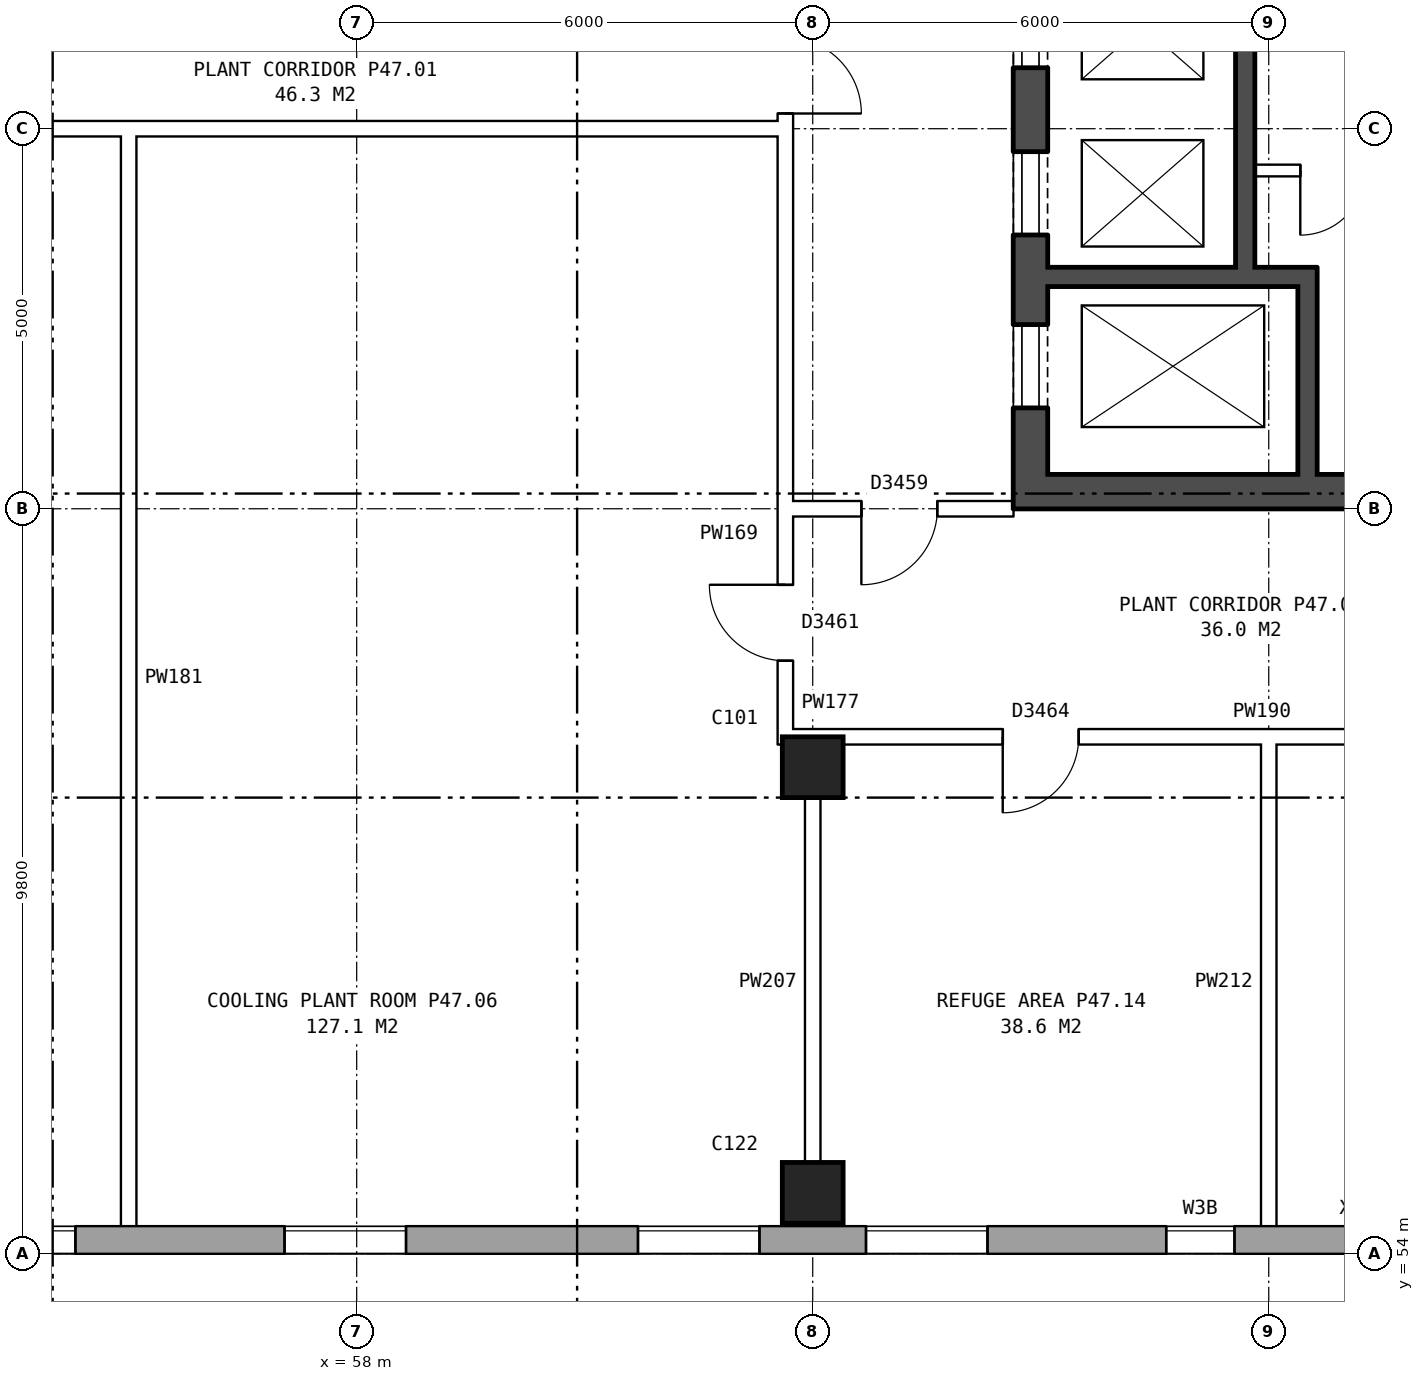
"""IFC4 building model, lengths in metres.
Left out: names, types, materials, properties, quantities, classifications, styles, units other than length and angle.
Written with IfcOpenShell. Run it as: python <this file> out.ifc"""

import sys

from ifc_helpers import new_model, si_unit, direction, frame, frame_2d, origin, origin_2d, place, context, subcontext, project, spatial, rectangle, extrude, element, fill, save


model = new_model("IFC4")
c1 = context("Model", 3, precision=1e-05, world=origin(), true_north=direction((0.0, 1.0)))
c2 = subcontext(c1, "Body", "Model", "MODEL_VIEW")
j1 = project(units=[si_unit("LENGTHUNIT", "METRE"), si_unit("PLANEANGLEUNIT", "RADIAN")], contexts=[c1])
p1 = place(None, origin())
s1 = spatial("IfcSite", under=j1, at=p1, CompositionType="ELEMENT")
p2 = place(p1, origin())
s2 = spatial("IfcBuilding", under=s1, at=p2, CompositionType="ELEMENT")
p3 = place(p2, frame((0.0, 0.0, 167.1)))
s3 = spatial("IfcBuildingStorey", under=s2, at=p3, CompositionType="ELEMENT", Elevation=167.1)
for number, where, z_axis, x_axis in (
    (1, (64.0, 54.8, 0.0), (0.0, 0.0, 1.0), (1.0, 0.0, 0.0)),
    (2, (64.0, 60.4, 0.0), (0.0, 0.0, 1.0), (1.0, 0.0, 0.0)),
):
    element("IfcColumn", number, at=place(p3, frame(where, z_axis=z_axis, x_axis=x_axis)), inside=s3, PredefinedType="COLUMN", context=c2, shape_type="SweptSolid", body=[
        extrude(rectangle(XDim=0.8, YDim=0.8, at=origin_2d()), origin(), (0.0, 0.0, 1.0), 4.2),
    ])
p4 = place(p3, frame((33.325, 54.18, 0.0), z_axis=(0.0, 0.0, 1.0), x_axis=(1.0, 0.0, 0.0)))
e3 = element("IfcWall", 3, at=p4, inside=s3, PredefinedType="STANDARD", context=c2, shape_type="SweptSolid", body=[
    extrude(rectangle(XDim=39.601, YDim=0.36, at=frame_2d((19.8, 0.0))), origin(), (0.0, 0.0, 1.0), 4.2),
])
p5 = place(p4, frame((0.5, 0.0, 1.5)))
e4 = element("IfcOpeningElement", 4, at=p5, cuts=e3, PredefinedType="OPENING", context=c2, shape_type="SweptSolid", body=[
    extrude(rectangle(XDim=1.6, YDim=1.2, at=frame_2d((0.8, 0.6))), frame((0.0, 0.19, 0.0), z_axis=(0.0, -1.0, 0.0), x_axis=(1.0, 0.0, 0.0)), (0.0, 0.0, 1.0), 0.38),
])
p6 = place(p4, frame((5.125, 0.0, 1.5)))
e5 = element("IfcOpeningElement", 5, at=p6, cuts=e3, PredefinedType="OPENING", context=c2, shape_type="SweptSolid", body=[
    extrude(rectangle(XDim=1.6, YDim=1.2, at=frame_2d((0.8, 0.6))), frame((0.0, 0.19, 0.0), z_axis=(0.0, -1.0, 0.0), x_axis=(1.0, 0.0, 0.0)), (0.0, 0.0, 1.0), 0.38),
])
p7 = place(p4, frame((7.375, 0.0, 1.5)))
e6 = element("IfcOpeningElement", 6, at=p7, cuts=e3, PredefinedType="OPENING", context=c2, shape_type="SweptSolid", body=[
    extrude(rectangle(XDim=1.6, YDim=1.2, at=frame_2d((0.8, 0.6))), frame((0.0, 0.19, 0.0), z_axis=(0.0, -1.0, 0.0), x_axis=(1.0, 0.0, 0.0)), (0.0, 0.0, 1.0), 0.38),
])
p8 = place(p4, frame((12.125, 0.0, 1.5)))
e7 = element("IfcOpeningElement", 7, at=p8, cuts=e3, PredefinedType="OPENING", context=c2, shape_type="SweptSolid", body=[
    extrude(rectangle(XDim=1.6, YDim=1.2, at=frame_2d((0.8, 0.6))), frame((0.0, 0.19, 0.0), z_axis=(0.0, -1.0, 0.0), x_axis=(1.0, 0.0, 0.0)), (0.0, 0.0, 1.0), 0.38),
])
p9 = place(p4, frame((18.275, 0.0, 1.5)))
e8 = element("IfcOpeningElement", 8, at=p9, cuts=e3, PredefinedType="OPENING", context=c2, shape_type="SweptSolid", body=[
    extrude(rectangle(XDim=0.6, YDim=1.2, at=frame_2d((0.3, 0.6))), frame((0.0, 0.19, 0.0), z_axis=(0.0, -1.0, 0.0), x_axis=(1.0, 0.0, 0.0)), (0.0, 0.0, 1.0), 0.38),
])
p10 = place(p4, frame((16.375, 0.0, 1.5)))
e9 = element("IfcOpeningElement", 9, at=p10, cuts=e3, PredefinedType="OPENING", context=c2, shape_type="SweptSolid", body=[
    extrude(rectangle(XDim=1.6, YDim=1.2, at=frame_2d((0.8, 0.6))), frame((0.0, 0.19, 0.0), z_axis=(0.0, -1.0, 0.0), x_axis=(1.0, 0.0, 0.0)), (0.0, 0.0, 1.0), 0.38),
])
p11 = place(p4, frame((19.375, 0.0, 1.5)))
e10 = element("IfcOpeningElement", 10, at=p11, cuts=e3, PredefinedType="OPENING", context=c2, shape_type="SweptSolid", body=[
    extrude(rectangle(XDim=1.6, YDim=1.2, at=frame_2d((0.8, 0.6))), frame((0.0, 0.19, 0.0), z_axis=(0.0, -1.0, 0.0), x_axis=(1.0, 0.0, 0.0)), (0.0, 0.0, 1.0), 0.38),
])
p12 = place(p4, frame((23.725, 0.0, 1.5)))
e11 = element("IfcOpeningElement", 11, at=p12, cuts=e3, PredefinedType="OPENING", context=c2, shape_type="SweptSolid", body=[
    extrude(rectangle(XDim=1.6, YDim=1.2, at=frame_2d((0.8, 0.6))), frame((0.0, 0.19, 0.0), z_axis=(0.0, -1.0, 0.0), x_axis=(1.0, 0.0, 0.0)), (0.0, 0.0, 1.0), 0.38),
])
p13 = place(p4, frame((28.375, 0.0, 1.5)))
e12 = element("IfcOpeningElement", 12, at=p13, cuts=e3, PredefinedType="OPENING", context=c2, shape_type="SweptSolid", body=[
    extrude(rectangle(XDim=1.6, YDim=1.2, at=frame_2d((0.8, 0.6))), frame((0.0, 0.19, 0.0), z_axis=(0.0, -1.0, 0.0), x_axis=(1.0, 0.0, 0.0)), (0.0, 0.0, 1.0), 0.38),
])
p14 = place(p4, frame((31.375, 0.0, 1.5)))
e13 = element("IfcOpeningElement", 13, at=p14, cuts=e3, PredefinedType="OPENING", context=c2, shape_type="SweptSolid", body=[
    extrude(rectangle(XDim=1.6, YDim=1.2, at=frame_2d((0.8, 0.6))), frame((0.0, 0.19, 0.0), z_axis=(0.0, -1.0, 0.0), x_axis=(1.0, 0.0, 0.0)), (0.0, 0.0, 1.0), 0.38),
])
p15 = place(p4, frame((35.325, 0.0, 1.5)))
e14 = element("IfcOpeningElement", 14, at=p15, cuts=e3, PredefinedType="OPENING", context=c2, shape_type="SweptSolid", body=[
    extrude(rectangle(XDim=0.9, YDim=1.2, at=frame_2d((0.45, 0.6))), frame((0.0, 0.19, 0.0), z_axis=(0.0, -1.0, 0.0), x_axis=(1.0, 0.0, 0.0)), (0.0, 0.0, 1.0), 0.38),
])
p16 = place(p3, frame((66.865, 63.8, 0.0), z_axis=(0.0, 0.0, 1.0), x_axis=(0.0, 1.0, 0.0)))
e15 = element("IfcWall", 15, at=p16, inside=s3, PredefinedType="SHEAR", context=c2, shape_type="SweptSolid", body=[
    extrude(rectangle(XDim=12.4, YDim=0.45, at=frame_2d((6.2, 0.0))), origin(), (0.0, 0.0, 1.0), 4.2),
])
p17 = place(p16, frame((1.325, 0.0, 0.0)))
e16 = element("IfcOpeningElement", 16, at=p17, cuts=e15, PredefinedType="OPENING", context=c2, shape_type="SweptSolid", body=[
    extrude(rectangle(XDim=1.1, YDim=2.1, at=frame_2d((0.55, 1.05))), frame((0.0, 0.235, 0.0), z_axis=(0.0, -1.0, 0.0), x_axis=(1.0, 0.0, 0.0)), (0.0, 0.0, 1.0), 0.47),
])
p18 = place(p16, frame((3.6, 0.0, 0.0)))
e17 = element("IfcOpeningElement", 17, at=p18, cuts=e15, PredefinedType="OPENING", context=c2, shape_type="SweptSolid", body=[
    extrude(rectangle(XDim=1.1, YDim=2.1, at=frame_2d((0.55, 1.05))), frame((0.0, 0.235, 0.0), z_axis=(0.0, -1.0, 0.0), x_axis=(1.0, 0.0, 0.0)), (0.0, 0.0, 1.0), 0.47),
])
p19 = place(p16, frame((5.8, 0.0, 0.0)))
e18 = element("IfcOpeningElement", 18, at=p19, cuts=e15, PredefinedType="OPENING", context=c2, shape_type="SweptSolid", body=[
    extrude(rectangle(XDim=1.1, YDim=2.1, at=frame_2d((0.55, 1.05))), frame((0.0, 0.235, 0.0), z_axis=(0.0, -1.0, 0.0), x_axis=(1.0, 0.0, 0.0)), (0.0, 0.0, 1.0), 0.47),
])
p20 = place(p16, frame((8.0, 0.0, 0.0)))
e19 = element("IfcOpeningElement", 19, at=p20, cuts=e15, PredefinedType="OPENING", context=c2, shape_type="SweptSolid", body=[
    extrude(rectangle(XDim=1.1, YDim=2.1, at=frame_2d((0.55, 1.05))), frame((0.0, 0.235, 0.0), z_axis=(0.0, -1.0, 0.0), x_axis=(1.0, 0.0, 0.0)), (0.0, 0.0, 1.0), 0.47),
])
p21 = place(p16, frame((9.9, 0.0, 0.0)))
e20 = element("IfcOpeningElement", 20, at=p21, cuts=e15, PredefinedType="OPENING", context=c2, shape_type="SweptSolid", body=[
    extrude(rectangle(XDim=1.1, YDim=2.1, at=frame_2d((0.55, 1.05))), frame((0.0, 0.235, 0.0), z_axis=(0.0, -1.0, 0.0), x_axis=(1.0, 0.0, 0.0)), (0.0, 0.0, 1.0), 0.47),
])
p22 = place(p3, frame((67.09, 64.025, 0.0), z_axis=(0.0, 0.0, 1.0), x_axis=(1.0, 0.0, 0.0)))
e21 = element("IfcWall", 21, at=p22, inside=s3, PredefinedType="SHEAR", context=c2, shape_type="SweptSolid", body=[
    extrude(rectangle(XDim=8.1, YDim=0.45, at=frame_2d((4.05, 0.0))), origin(), (0.0, 0.0, 1.0), 4.2),
])
p23 = place(p3, frame((67.09, 66.85, 0.0), z_axis=(0.0, 0.0, 1.0), x_axis=(1.0, 0.0, 0.0)))
e22 = element("IfcWall", 22, at=p23, inside=s3, PredefinedType="SHEAR", context=c2, shape_type="SweptSolid", body=[
    extrude(rectangle(XDim=3.545, YDim=0.25, at=frame_2d((1.772, 0.0))), origin(), (0.0, 0.0, 1.0), 4.2),
])
p24 = place(p3, frame((69.815, 68.25, 0.0), z_axis=(0.0, 0.0, 1.0), x_axis=(1.0, 0.0, 0.0)))
e23 = element("IfcWall", 23, at=p24, inside=s3, PredefinedType="PARTITIONING", context=c2, shape_type="SweptSolid", body=[
    extrude(rectangle(XDim=2.05, YDim=0.15, at=frame_2d((1.025, 0.0))), origin(), (0.0, 0.0, 1.0), 4.2),
])
p25 = place(p24, frame((0.6, 0.0, 0.0)))
e24 = element("IfcOpeningElement", 24, at=p25, cuts=e23, PredefinedType="OPENING", context=c2, shape_type="SweptSolid", body=[
    extrude(rectangle(XDim=0.85, YDim=2.1, at=frame_2d((0.425, 1.05))), frame((0.0, 0.085, 0.0), z_axis=(0.0, -1.0, 0.0), x_axis=(1.0, 0.0, 0.0)), (0.0, 0.0, 1.0), 0.17),
])
p26 = place(p3, frame((69.69, 66.975, 0.0), z_axis=(0.0, 0.0, 1.0), x_axis=(0.0, 1.0, 0.0)))
e25 = element("IfcWall", 25, at=p26, inside=s3, PredefinedType="SHEAR", context=c2, shape_type="SweptSolid", body=[
    extrude(rectangle(XDim=6.6, YDim=0.25, at=frame_2d((3.3, 0.0))), origin(), (0.0, 0.0, 1.0), 4.2),
])
p27 = place(p3, frame((70.51, 64.25, 0.0), z_axis=(0.0, 0.0, 1.0), x_axis=(0.0, 1.0, 0.0)))
e26 = element("IfcWall", 26, at=p27, inside=s3, PredefinedType="SHEAR", context=c2, shape_type="SweptSolid", body=[
    extrude(rectangle(XDim=2.475, YDim=0.25, at=frame_2d((1.238, 0.0))), origin(), (0.0, 0.0, 1.0), 4.2),
])
p28 = place(p3, frame((63.64, 63.9, 0.0), z_axis=(0.0, 0.0, 1.0), x_axis=(0.0, 1.0, 0.0)))
e27 = element("IfcWall", 27, at=p28, inside=s3, PredefinedType="PARTITIONING", context=c2, shape_type="SweptSolid", body=[
    extrude(rectangle(XDim=12.2, YDim=0.2, at=frame_2d((6.1, 0.0))), origin(), (0.0, 0.0, 1.0), 4.2),
])
p29 = place(p28, frame((5.1, 0.0, 0.0)))
e28 = element("IfcOpeningElement", 28, at=p29, cuts=e27, PredefinedType="OPENING", context=c2, shape_type="SweptSolid", body=[
    extrude(rectangle(XDim=2.0, YDim=2.1, at=frame_2d((1.0, 1.05))), frame((0.0, 0.11, 0.0), z_axis=(0.0, -1.0, 0.0), x_axis=(1.0, 0.0, 0.0)), (0.0, 0.0, 1.0), 0.22),
])
p30 = place(p3, frame((63.54, 60.8, 0.0), z_axis=(0.0, 0.0, 1.0), x_axis=(1.0, 0.0, 0.0)))
e29 = element("IfcWall", 29, at=p30, inside=s3, PredefinedType="PARTITIONING", context=c2, shape_type="SweptSolid", body=[
    extrude(rectangle(XDim=12.22, YDim=0.2, at=frame_2d((6.11, 0.0))), origin(), (0.0, 0.0, 1.0), 4.2),
])
p31 = place(p30, frame((2.96, 0.0, 0.0)))
e30 = element("IfcOpeningElement", 30, at=p31, cuts=e29, PredefinedType="OPENING", context=c2, shape_type="SweptSolid", body=[
    extrude(rectangle(XDim=1.0, YDim=2.1, at=frame_2d((0.5, 1.05))), frame((0.0, 0.11, 0.0), z_axis=(0.0, -1.0, 0.0), x_axis=(1.0, 0.0, 0.0)), (0.0, 0.0, 1.0), 0.22),
])
p32 = place(p30, frame((8.78, 0.0, 0.0)))
e31 = element("IfcOpeningElement", 31, at=p32, cuts=e29, PredefinedType="OPENING", context=c2, shape_type="SweptSolid", body=[
    extrude(rectangle(XDim=1.0, YDim=2.1, at=frame_2d((0.5, 1.05))), frame((0.0, 0.11, 0.0), z_axis=(0.0, -1.0, 0.0), x_axis=(1.0, 0.0, 0.0)), (0.0, 0.0, 1.0), 0.22),
])
p33 = place(p3, frame((63.54, 63.8, 0.0), z_axis=(0.0, 0.0, 1.0), x_axis=(1.0, 0.0, 0.0)))
e32 = element("IfcWall", 32, at=p33, inside=s3, PredefinedType="PARTITIONING", context=c2, shape_type="SweptSolid", body=[
    extrude(rectangle(XDim=3.1, YDim=0.2, at=frame_2d((1.55, 0.0))), origin(), (0.0, 0.0, 1.0), 4.2),
])
p34 = place(p33, frame((1.1, 0.0, 0.0)))
e33 = element("IfcOpeningElement", 33, at=p34, cuts=e32, PredefinedType="OPENING", context=c2, shape_type="SweptSolid", body=[
    extrude(rectangle(XDim=1.0, YDim=2.1, at=frame_2d((0.5, 1.05))), frame((0.0, 0.11, 0.0), z_axis=(0.0, -1.0, 0.0), x_axis=(1.0, 0.0, 0.0)), (0.0, 0.0, 1.0), 0.22),
])
p35 = place(p3, frame((44.36, 68.8, 0.0), z_axis=(0.0, 0.0, 1.0), x_axis=(1.0, 0.0, 0.0)))
e34 = element("IfcWall", 34, at=p35, inside=s3, PredefinedType="PARTITIONING", context=c2, shape_type="SweptSolid", body=[
    extrude(rectangle(XDim=19.28, YDim=0.2, at=frame_2d((9.64, 0.0))), origin(), (0.0, 0.0, 1.0), 4.2),
])
p36 = place(p3, frame((55.0, 54.24, 0.0), z_axis=(0.0, 0.0, 1.0), x_axis=(0.0, 1.0, 0.0)))
e35 = element("IfcWall", 35, at=p36, inside=s3, PredefinedType="PARTITIONING", context=c2, shape_type="SweptSolid", body=[
    extrude(rectangle(XDim=14.66, YDim=0.2, at=frame_2d((7.33, 0.0))), origin(), (0.0, 0.0, 1.0), 4.2),
])
p37 = place(p3, frame((63.64, 60.7, 0.0), z_axis=(0.0, 0.0, 1.0), x_axis=(0.0, 1.0, 0.0)))
e36 = element("IfcWall", 36, at=p37, inside=s3, PredefinedType="PARTITIONING", context=c2, shape_type="SweptSolid", body=[
    extrude(rectangle(XDim=3.2, YDim=0.2, at=frame_2d((1.6, 0.0))), origin(), (0.0, 0.0, 1.0), 4.2),
])
p38 = place(p37, frame((1.1, 0.0, 0.0)))
e37 = element("IfcOpeningElement", 37, at=p38, cuts=e36, PredefinedType="OPENING", context=c2, shape_type="SweptSolid", body=[
    extrude(rectangle(XDim=1.0, YDim=2.1, at=frame_2d((0.5, 1.05))), frame((0.0, 0.11, 0.0), z_axis=(0.0, -1.0, 0.0), x_axis=(1.0, 0.0, 0.0)), (0.0, 0.0, 1.0), 0.22),
])
for number, where, z_axis, x_axis in (
    (38, (64.0, 54.24, 0.0), (0.0, 0.0, 1.0), (0.0, 1.0, 0.0)),
    (39, (70.0, 54.24, 0.0), (0.0, 0.0, 1.0), (0.0, 1.0, 0.0)),
):
    element("IfcWall", number, at=place(p3, frame(where, z_axis=z_axis, x_axis=x_axis)), inside=s3, PredefinedType="PARTITIONING", context=c2, shape_type="SweptSolid", body=[
        extrude(rectangle(XDim=6.66, YDim=0.2, at=frame_2d((3.33, 0.0))), origin(), (0.0, 0.0, 1.0), 4.2),
    ])
p39 = place(p11, origin())
e40 = element("IfcWindow", 40, at=p39, inside=s3, PartitioningType="DOUBLE_PANEL_HORIZONTAL", PredefinedType="WINDOW", context=c2, shape_type="SweptSolid", body=[
    extrude(rectangle(XDim=1.6, YDim=1.2, at=frame_2d((0.8, 0.6))), frame((0.0, 0.15, 0.0), z_axis=(0.0, -1.0, 0.0), x_axis=(1.0, 0.0, 0.0)), (0.0, 0.0, 1.0), 0.06),
])
fill(e10, e40)
p40 = place(p12, origin())
e41 = element("IfcWindow", 41, at=p40, inside=s3, PartitioningType="DOUBLE_PANEL_HORIZONTAL", PredefinedType="WINDOW", context=c2, shape_type="SweptSolid", body=[
    extrude(rectangle(XDim=1.6, YDim=1.2, at=frame_2d((0.8, 0.6))), frame((0.0, 0.15, 0.0), z_axis=(0.0, -1.0, 0.0), x_axis=(1.0, 0.0, 0.0)), (0.0, 0.0, 1.0), 0.06),
])
fill(e11, e41)
p41 = place(p13, origin())
e42 = element("IfcWindow", 42, at=p41, inside=s3, PartitioningType="DOUBLE_PANEL_HORIZONTAL", PredefinedType="WINDOW", context=c2, shape_type="SweptSolid", body=[
    extrude(rectangle(XDim=1.6, YDim=1.2, at=frame_2d((0.8, 0.6))), frame((0.0, 0.15, 0.0), z_axis=(0.0, -1.0, 0.0), x_axis=(1.0, 0.0, 0.0)), (0.0, 0.0, 1.0), 0.06),
])
fill(e12, e42)
p42 = place(p14, origin())
e43 = element("IfcWindow", 43, at=p42, inside=s3, PartitioningType="DOUBLE_PANEL_HORIZONTAL", PredefinedType="WINDOW", context=c2, shape_type="SweptSolid", body=[
    extrude(rectangle(XDim=1.6, YDim=1.2, at=frame_2d((0.8, 0.6))), frame((0.0, 0.15, 0.0), z_axis=(0.0, -1.0, 0.0), x_axis=(1.0, 0.0, 0.0)), (0.0, 0.0, 1.0), 0.06),
])
fill(e13, e43)
p43 = place(p15, origin())
e44 = element("IfcWindow", 44, at=p43, inside=s3, PartitioningType="DOUBLE_PANEL_HORIZONTAL", PredefinedType="WINDOW", context=c2, shape_type="SweptSolid", body=[
    extrude(rectangle(XDim=0.9, YDim=1.2, at=frame_2d((0.45, 0.6))), frame((0.0, 0.15, 0.0), z_axis=(0.0, -1.0, 0.0), x_axis=(1.0, 0.0, 0.0)), (0.0, 0.0, 1.0), 0.06),
])
fill(e14, e44)
p44 = place(p17, origin())
e45 = element("IfcDoor", 45, at=p44, inside=s3, OperationType="DOUBLE_DOOR_SLIDING", PredefinedType="DOOR", context=c2, shape_type="SweptSolid", body=[
    extrude(rectangle(XDim=1.1, YDim=2.1, at=frame_2d((0.55, 1.05))), frame((0.0, -0.16, 0.0), z_axis=(0.0, -1.0, 0.0), x_axis=(1.0, 0.0, 0.0)), (0.0, 0.0, 1.0), 0.05),
])
fill(e16, e45)
p45 = place(p18, origin())
e46 = element("IfcDoor", 46, at=p45, inside=s3, OperationType="DOUBLE_DOOR_SLIDING", PredefinedType="DOOR", context=c2, shape_type="SweptSolid", body=[
    extrude(rectangle(XDim=1.1, YDim=2.1, at=frame_2d((0.55, 1.05))), frame((0.0, -0.16, 0.0), z_axis=(0.0, -1.0, 0.0), x_axis=(1.0, 0.0, 0.0)), (0.0, 0.0, 1.0), 0.05),
])
fill(e17, e46)
p46 = place(p19, origin())
e47 = element("IfcDoor", 47, at=p46, inside=s3, OperationType="DOUBLE_DOOR_SLIDING", PredefinedType="DOOR", context=c2, shape_type="SweptSolid", body=[
    extrude(rectangle(XDim=1.1, YDim=2.1, at=frame_2d((0.55, 1.05))), frame((0.0, -0.16, 0.0), z_axis=(0.0, -1.0, 0.0), x_axis=(1.0, 0.0, 0.0)), (0.0, 0.0, 1.0), 0.05),
])
fill(e18, e47)
p47 = place(p25, frame((0.85, 0.0, 0.0), z_axis=(0.0, 0.0, 1.0), x_axis=(-1.0, 0.0, 0.0)))
e48 = element("IfcDoor", 48, at=p47, inside=s3, OperationType="SINGLE_SWING_RIGHT", PredefinedType="DOOR", context=c2, shape_type="SweptSolid", body=[
    extrude(rectangle(XDim=0.85, YDim=2.1, at=frame_2d((0.425, 1.05))), frame((0.0, 0.025, 0.0), z_axis=(0.0, -1.0, 0.0), x_axis=(1.0, 0.0, 0.0)), (0.0, 0.0, 1.0), 0.05),
])
fill(e24, e48)
p48 = place(p29, frame((2.0, 0.0, 0.0), z_axis=(0.0, 0.0, 1.0), x_axis=(-1.0, 0.0, 0.0)))
e49 = element("IfcDoor", 49, at=p48, inside=s3, OperationType="DOUBLE_DOOR_SINGLE_SWING", PredefinedType="DOOR", context=c2, shape_type="SweptSolid", body=[
    extrude(rectangle(XDim=2.0, YDim=2.1, at=frame_2d((1.0, 1.05))), frame((0.0, 0.025, 0.0), z_axis=(0.0, -1.0, 0.0), x_axis=(1.0, 0.0, 0.0)), (0.0, 0.0, 1.0), 0.05),
])
fill(e28, e49)
p49 = place(p31, frame((1.0, 0.0, 0.0), z_axis=(0.0, 0.0, 1.0), x_axis=(-1.0, 0.0, 0.0)))
e50 = element("IfcDoor", 50, at=p49, inside=s3, OperationType="SINGLE_SWING_RIGHT", PredefinedType="DOOR", context=c2, shape_type="SweptSolid", body=[
    extrude(rectangle(XDim=1.0, YDim=2.1, at=frame_2d((0.5, 1.05))), frame((0.0, 0.025, 0.0), z_axis=(0.0, -1.0, 0.0), x_axis=(1.0, 0.0, 0.0)), (0.0, 0.0, 1.0), 0.05),
])
fill(e30, e50)
p50 = place(p34, frame((1.0, 0.0, 0.0), z_axis=(0.0, 0.0, 1.0), x_axis=(-1.0, 0.0, 0.0)))
e51 = element("IfcDoor", 51, at=p50, inside=s3, OperationType="SINGLE_SWING_RIGHT", PredefinedType="DOOR", context=c2, shape_type="SweptSolid", body=[
    extrude(rectangle(XDim=1.0, YDim=2.1, at=frame_2d((0.5, 1.05))), frame((0.0, 0.025, 0.0), z_axis=(0.0, -1.0, 0.0), x_axis=(1.0, 0.0, 0.0)), (0.0, 0.0, 1.0), 0.05),
])
fill(e33, e51)
p51 = place(p38, origin())
e52 = element("IfcDoor", 52, at=p51, inside=s3, OperationType="SINGLE_SWING_RIGHT", PredefinedType="DOOR", context=c2, shape_type="SweptSolid", body=[
    extrude(rectangle(XDim=1.0, YDim=2.1, at=frame_2d((0.5, 1.05))), frame((0.0, 0.025, 0.0), z_axis=(0.0, -1.0, 0.0), x_axis=(1.0, 0.0, 0.0)), (0.0, 0.0, 1.0), 0.05),
])
fill(e37, e52)
save(model, sys.argv[1])
